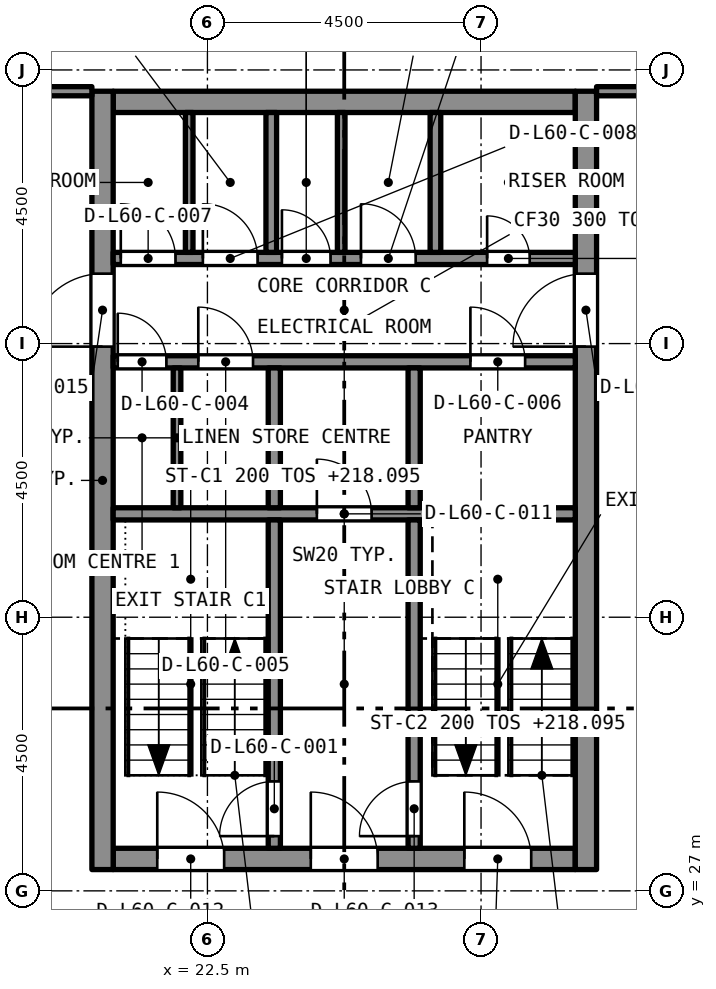
"""IFC4 building model, lengths in metres.
Left out: names, types, materials, properties, quantities, classifications, styles, units other than length and angle.
Written with IfcOpenShell. Run it as: python <this file> out.ifc"""

import sys

from ifc_helpers import new_model, si_unit, direction, frame, frame_2d, origin, place, context, subcontext, project, spatial, rectangle, extrude, element, fill, save


model = new_model("IFC4")
c1 = context("Model", 3, precision=1e-05, world=origin(), true_north=direction((0.0, 1.0)))
c2 = subcontext(c1, "Body", "Model", "MODEL_VIEW")
j1 = project(units=[si_unit("LENGTHUNIT", "METRE"), si_unit("PLANEANGLEUNIT", "RADIAN")], contexts=[c1])
p1 = place(None, origin())
s1 = spatial("IfcSite", under=j1, at=p1, CompositionType="ELEMENT")
p2 = place(p1, origin())
s2 = spatial("IfcBuilding", under=s1, at=p2, CompositionType="ELEMENT")
p3 = place(p2, frame((0.0, 0.0, 216.495)))
s3 = spatial("IfcBuildingStorey", under=s2, at=p3, CompositionType="ELEMENT", Elevation=216.495)
p4 = place(p3, frame((20.95, 27.525, 0.0), z_axis=(0.0, 0.0, 1.0), x_axis=(1.0, 0.0, 0.0)))
e1 = element("IfcWall", 1, at=p4, inside=s3, PredefinedType="SOLIDWALL", context=c2, shape_type="SweptSolid", body=[
    extrude(rectangle(XDim=7.6, YDim=0.35, at=frame_2d((3.8, 0.0))), origin(), (0.0, 0.0, 1.0), 3.2),
])
p5 = place(p4, frame((0.725, 0.0, 0.0)))
e2 = element("IfcOpeningElement", 2, at=p5, cuts=e1, PredefinedType="OPENING", context=c2, shape_type="SweptSolid", body=[
    extrude(rectangle(XDim=1.1, YDim=2.1, at=frame_2d((0.55, 1.05))), frame((0.0, 0.185, 0.0), z_axis=(0.0, -1.0, 0.0), x_axis=(1.0, 0.0, 0.0)), (0.0, 0.0, 1.0), 0.37),
])
p6 = place(p4, frame((3.25, 0.0, 0.0)))
e3 = element("IfcOpeningElement", 3, at=p6, cuts=e1, PredefinedType="OPENING", context=c2, shape_type="SweptSolid", body=[
    extrude(rectangle(XDim=1.1, YDim=2.1, at=frame_2d((0.55, 1.05))), frame((0.0, 0.185, 0.0), z_axis=(0.0, -1.0, 0.0), x_axis=(1.0, 0.0, 0.0)), (0.0, 0.0, 1.0), 0.37),
])
p7 = place(p4, frame((5.775, 0.0, 0.0)))
e4 = element("IfcOpeningElement", 4, at=p7, cuts=e1, PredefinedType="OPENING", context=c2, shape_type="SweptSolid", body=[
    extrude(rectangle(XDim=1.1, YDim=2.1, at=frame_2d((0.55, 1.05))), frame((0.0, 0.185, 0.0), z_axis=(0.0, -1.0, 0.0), x_axis=(1.0, 0.0, 0.0)), (0.0, 0.0, 1.0), 0.37),
])
p8 = place(p3, frame((20.95, 39.975, 0.0), z_axis=(0.0, 0.0, 1.0), x_axis=(1.0, 0.0, 0.0)))
e5 = element("IfcWall", 5, at=p8, inside=s3, PredefinedType="SOLIDWALL", context=c2, shape_type="SweptSolid", body=[
    extrude(rectangle(XDim=7.6, YDim=0.35, at=frame_2d((3.8, 0.0))), origin(), (0.0, 0.0, 1.0), 3.2),
])
p9 = place(p3, frame((20.775, 27.35, 0.0), z_axis=(0.0, 0.0, 1.0), x_axis=(0.0, 1.0, 0.0)))
e6 = element("IfcWall", 6, at=p9, inside=s3, PredefinedType="SOLIDWALL", context=c2, shape_type="SweptSolid", body=[
    extrude(rectangle(XDim=12.8, YDim=0.35, at=frame_2d((6.4, 0.0))), origin(), (0.0, 0.0, 1.0), 3.2),
])
p10 = place(p9, frame((8.6, 0.0, 0.0)))
e7 = element("IfcOpeningElement", 7, at=p10, cuts=e6, PredefinedType="OPENING", context=c2, shape_type="SweptSolid", body=[
    extrude(rectangle(XDim=1.2, YDim=2.1, at=frame_2d((0.6, 1.05))), frame((0.0, 0.185, 0.0), z_axis=(0.0, -1.0, 0.0), x_axis=(1.0, 0.0, 0.0)), (0.0, 0.0, 1.0), 0.37),
])
p11 = place(p3, frame((28.725, 27.35, 0.0), z_axis=(0.0, 0.0, 1.0), x_axis=(0.0, 1.0, 0.0)))
e8 = element("IfcWall", 8, at=p11, inside=s3, PredefinedType="SOLIDWALL", context=c2, shape_type="SweptSolid", body=[
    extrude(rectangle(XDim=12.8, YDim=0.35, at=frame_2d((6.4, 0.0))), origin(), (0.0, 0.0, 1.0), 3.2),
])
p12 = place(p11, frame((8.6, 0.0, 0.0)))
e9 = element("IfcOpeningElement", 9, at=p12, cuts=e8, PredefinedType="OPENING", context=c2, shape_type="SweptSolid", body=[
    extrude(rectangle(XDim=1.2, YDim=2.1, at=frame_2d((0.6, 1.05))), frame((0.0, 0.185, 0.0), z_axis=(0.0, -1.0, 0.0), x_axis=(1.0, 0.0, 0.0)), (0.0, 0.0, 1.0), 0.37),
])
p13 = place(p3, frame((18.4, 40.15, 0.0), z_axis=(0.0, 0.0, 1.0), x_axis=(1.0, 0.0, 0.0)))
e10 = element("IfcWall", 10, at=p13, inside=s3, PredefinedType="PARTITIONING", context=c2, shape_type="SweptSolid", body=[
    extrude(rectangle(XDim=2.2, YDim=0.15, at=frame_2d((1.1, 0.0))), origin(), (0.0, 0.0, 1.0), 2.75),
])
p14 = place(p13, frame((0.2, 0.0, 0.0)))
e11 = element("IfcOpeningElement", 11, at=p14, cuts=e10, PredefinedType="OPENING", context=c2, shape_type="SweptSolid", body=[
    extrude(rectangle(XDim=1.0, YDim=2.1, at=frame_2d((0.5, 1.05))), frame((0.0, 0.085, 0.0), z_axis=(0.0, -1.0, 0.0), x_axis=(1.0, 0.0, 0.0)), (0.0, 0.0, 1.0), 0.17),
])
p15 = place(p3, frame((28.9, 40.15, 0.0), z_axis=(0.0, 0.0, 1.0), x_axis=(1.0, 0.0, 0.0)))
e12 = element("IfcWall", 12, at=p15, inside=s3, PredefinedType="PARTITIONING", context=c2, shape_type="SweptSolid", body=[
    extrude(rectangle(XDim=2.2, YDim=0.15, at=frame_2d((1.1, 0.0))), origin(), (0.0, 0.0, 1.0), 2.75),
])
p16 = place(p3, frame((20.95, 33.2, 0.0), z_axis=(0.0, 0.0, 1.0), x_axis=(1.0, 0.0, 0.0)))
e13 = element("IfcWall", 13, at=p16, inside=s3, PredefinedType="SOLIDWALL", context=c2, shape_type="SweptSolid", body=[
    extrude(rectangle(XDim=7.6, YDim=0.2, at=frame_2d((3.8, 0.0))), origin(), (0.0, 0.0, 1.0), 2.9),
])
p17 = place(p16, frame((3.35, 0.0, 0.0)))
e14 = element("IfcOpeningElement", 14, at=p17, cuts=e13, PredefinedType="OPENING", context=c2, shape_type="SweptSolid", body=[
    extrude(rectangle(XDim=0.9, YDim=2.1, at=frame_2d((0.45, 1.05))), frame((0.0, 0.11, 0.0), z_axis=(0.0, -1.0, 0.0), x_axis=(1.0, 0.0, 0.0)), (0.0, 0.0, 1.0), 0.22),
])
p18 = place(p3, frame((20.95, 35.7, 0.0), z_axis=(0.0, 0.0, 1.0), x_axis=(1.0, 0.0, 0.0)))
e15 = element("IfcWall", 15, at=p18, inside=s3, PredefinedType="SOLIDWALL", context=c2, shape_type="SweptSolid", body=[
    extrude(rectangle(XDim=7.6, YDim=0.2, at=frame_2d((3.8, 0.0))), origin(), (0.0, 0.0, 1.0), 2.9),
])
p19 = place(p18, frame((0.075, 0.0, 0.0)))
e16 = element("IfcOpeningElement", 16, at=p19, cuts=e15, PredefinedType="OPENING", context=c2, shape_type="SweptSolid", body=[
    extrude(rectangle(XDim=0.8, YDim=2.1, at=frame_2d((0.4, 1.05))), frame((0.0, 0.11, 0.0), z_axis=(0.0, -1.0, 0.0), x_axis=(1.0, 0.0, 0.0)), (0.0, 0.0, 1.0), 0.22),
])
p20 = place(p18, frame((1.4, 0.0, 0.0)))
e17 = element("IfcOpeningElement", 17, at=p20, cuts=e15, PredefinedType="OPENING", context=c2, shape_type="SweptSolid", body=[
    extrude(rectangle(XDim=0.9, YDim=2.1, at=frame_2d((0.45, 1.05))), frame((0.0, 0.11, 0.0), z_axis=(0.0, -1.0, 0.0), x_axis=(1.0, 0.0, 0.0)), (0.0, 0.0, 1.0), 0.22),
])
p21 = place(p18, frame((5.875, 0.0, 0.0)))
e18 = element("IfcOpeningElement", 18, at=p21, cuts=e15, PredefinedType="OPENING", context=c2, shape_type="SweptSolid", body=[
    extrude(rectangle(XDim=0.9, YDim=2.1, at=frame_2d((0.45, 1.05))), frame((0.0, 0.11, 0.0), z_axis=(0.0, -1.0, 0.0), x_axis=(1.0, 0.0, 0.0)), (0.0, 0.0, 1.0), 0.22),
])
p22 = place(p3, frame((20.95, 37.4, 0.0), z_axis=(0.0, 0.0, 1.0), x_axis=(1.0, 0.0, 0.0)))
e19 = element("IfcWall", 19, at=p22, inside=s3, PredefinedType="SOLIDWALL", context=c2, shape_type="SweptSolid", body=[
    extrude(rectangle(XDim=7.6, YDim=0.2, at=frame_2d((3.8, 0.0))), origin(), (0.0, 0.0, 1.0), 2.9),
])
p23 = place(p22, frame((6.15, 0.0, 0.0)))
e20 = element("IfcOpeningElement", 20, at=p23, cuts=e19, PredefinedType="OPENING", context=c2, shape_type="SweptSolid", body=[
    extrude(rectangle(XDim=0.7, YDim=2.1, at=frame_2d((0.35, 1.05))), frame((0.0, 0.11, 0.0), z_axis=(0.0, -1.0, 0.0), x_axis=(1.0, 0.0, 0.0)), (0.0, 0.0, 1.0), 0.22),
])
p24 = place(p22, frame((0.125, 0.0, 0.0)))
e21 = element("IfcOpeningElement", 21, at=p24, cuts=e19, PredefinedType="OPENING", context=c2, shape_type="SweptSolid", body=[
    extrude(rectangle(XDim=0.9, YDim=2.1, at=frame_2d((0.45, 1.05))), frame((0.0, 0.11, 0.0), z_axis=(0.0, -1.0, 0.0), x_axis=(1.0, 0.0, 0.0)), (0.0, 0.0, 1.0), 0.22),
])
p25 = place(p22, frame((1.475, 0.0, 0.0)))
e22 = element("IfcOpeningElement", 22, at=p25, cuts=e19, PredefinedType="OPENING", context=c2, shape_type="SweptSolid", body=[
    extrude(rectangle(XDim=0.9, YDim=2.1, at=frame_2d((0.45, 1.05))), frame((0.0, 0.11, 0.0), z_axis=(0.0, -1.0, 0.0), x_axis=(1.0, 0.0, 0.0)), (0.0, 0.0, 1.0), 0.22),
])
p26 = place(p22, frame((2.775, 0.0, 0.0)))
e23 = element("IfcOpeningElement", 23, at=p26, cuts=e19, PredefinedType="OPENING", context=c2, shape_type="SweptSolid", body=[
    extrude(rectangle(XDim=0.8, YDim=2.1, at=frame_2d((0.4, 1.05))), frame((0.0, 0.11, 0.0), z_axis=(0.0, -1.0, 0.0), x_axis=(1.0, 0.0, 0.0)), (0.0, 0.0, 1.0), 0.22),
])
p27 = place(p22, frame((4.075, 0.0, 0.0)))
e24 = element("IfcOpeningElement", 24, at=p27, cuts=e19, PredefinedType="OPENING", context=c2, shape_type="SweptSolid", body=[
    extrude(rectangle(XDim=0.9, YDim=2.1, at=frame_2d((0.45, 1.05))), frame((0.0, 0.11, 0.0), z_axis=(0.0, -1.0, 0.0), x_axis=(1.0, 0.0, 0.0)), (0.0, 0.0, 1.0), 0.22),
])
p28 = place(p3, frame((23.6, 27.7, 0.0), z_axis=(0.0, 0.0, 1.0), x_axis=(0.0, 1.0, 0.0)))
e25 = element("IfcWall", 25, at=p28, inside=s3, PredefinedType="SOLIDWALL", context=c2, shape_type="SweptSolid", body=[
    extrude(rectangle(XDim=5.4, YDim=0.2, at=frame_2d((2.7, 0.0))), origin(), (0.0, 0.0, 1.0), 2.9),
])
p29 = place(p28, frame((0.2, 0.0, 0.0)))
e26 = element("IfcOpeningElement", 26, at=p29, cuts=e25, PredefinedType="OPENING", context=c2, shape_type="SweptSolid", body=[
    extrude(rectangle(XDim=0.9, YDim=2.1, at=frame_2d((0.45, 1.05))), frame((0.0, 0.11, 0.0), z_axis=(0.0, -1.0, 0.0), x_axis=(1.0, 0.0, 0.0)), (0.0, 0.0, 1.0), 0.22),
])
p30 = place(p3, frame((25.9, 27.7, 0.0), z_axis=(0.0, 0.0, 1.0), x_axis=(0.0, 1.0, 0.0)))
e27 = element("IfcWall", 27, at=p30, inside=s3, PredefinedType="SOLIDWALL", context=c2, shape_type="SweptSolid", body=[
    extrude(rectangle(XDim=5.4, YDim=0.2, at=frame_2d((2.7, 0.0))), origin(), (0.0, 0.0, 1.0), 2.9),
])
p31 = place(p30, frame((0.2, 0.0, 0.0)))
e28 = element("IfcOpeningElement", 28, at=p31, cuts=e27, PredefinedType="OPENING", context=c2, shape_type="SweptSolid", body=[
    extrude(rectangle(XDim=0.9, YDim=2.1, at=frame_2d((0.45, 1.05))), frame((0.0, 0.11, 0.0), z_axis=(0.0, -1.0, 0.0), x_axis=(1.0, 0.0, 0.0)), (0.0, 0.0, 1.0), 0.22),
])
for number, where, z_axis, x_axis in (
    (29, (23.6, 33.3, 0.0), (0.0, 0.0, 1.0), (0.0, 1.0, 0.0)),
    (30, (25.9, 33.3, 0.0), (0.0, 0.0, 1.0), (0.0, 1.0, 0.0)),
):
    element("IfcWall", number, at=place(p3, frame(where, z_axis=z_axis, x_axis=x_axis)), inside=s3, PredefinedType="SOLIDWALL", context=c2, shape_type="SweptSolid", body=[
        extrude(rectangle(XDim=2.3, YDim=0.2, at=frame_2d((1.15, 0.0))), origin(), (0.0, 0.0, 1.0), 2.9),
    ])
for number, where, z_axis, x_axis in (
    (31, (23.55, 37.5, 0.0), (0.0, 0.0, 1.0), (0.0, 1.0, 0.0)),
    (32, (26.25, 37.5, 0.0), (0.0, 0.0, 1.0), (0.0, 1.0, 0.0)),
):
    element("IfcWall", number, at=place(p3, frame(where, z_axis=z_axis, x_axis=x_axis)), inside=s3, PredefinedType="SOLIDWALL", context=c2, shape_type="SweptSolid", body=[
        extrude(rectangle(XDim=2.3, YDim=0.175, at=frame_2d((1.15, 0.0))), origin(), (0.0, 0.0, 1.0), 2.9),
    ])
for number, where, z_axis, x_axis in (
    (33, (22.0, 33.3, 0.0), (0.0, 0.0, 1.0), (0.0, 1.0, 0.0)),
    (34, (22.2, 37.5, 0.0), (0.0, 0.0, 1.0), (0.0, 1.0, 0.0)),
    (35, (24.7, 37.5, 0.0), (0.0, 0.0, 1.0), (0.0, 1.0, 0.0)),
):
    element("IfcWall", number, at=place(p3, frame(where, z_axis=z_axis, x_axis=x_axis)), inside=s3, PredefinedType="PARTITIONING", context=c2, shape_type="SweptSolid", body=[
        extrude(rectangle(XDim=2.3, YDim=0.125, at=frame_2d((1.15, 0.0))), origin(), (0.0, 0.0, 1.0), 2.9),
    ])
p32 = place(p29, origin())
e36 = element("IfcDoor", 36, at=p32, inside=s3, OperationType="SINGLE_SWING_LEFT", PredefinedType="DOOR", context=c2, shape_type="SweptSolid", body=[
    extrude(rectangle(XDim=0.9, YDim=2.1, at=frame_2d((0.45, 1.05))), frame((0.0, 0.025, 0.0), z_axis=(0.0, -1.0, 0.0), x_axis=(1.0, 0.0, 0.0)), (0.0, 0.0, 1.0), 0.05),
])
fill(e26, e36)
p33 = place(p31, origin())
e37 = element("IfcDoor", 37, at=p33, inside=s3, OperationType="SINGLE_SWING_LEFT", PredefinedType="DOOR", context=c2, shape_type="SweptSolid", body=[
    extrude(rectangle(XDim=0.9, YDim=2.1, at=frame_2d((0.45, 1.05))), frame((0.0, 0.025, 0.0), z_axis=(0.0, -1.0, 0.0), x_axis=(1.0, 0.0, 0.0)), (0.0, 0.0, 1.0), 0.05),
])
fill(e28, e37)
p34 = place(p23, origin())
e38 = element("IfcDoor", 38, at=p34, inside=s3, OperationType="SINGLE_SWING_LEFT", PredefinedType="DOOR", context=c2, shape_type="SweptSolid", body=[
    extrude(rectangle(XDim=0.7, YDim=2.1, at=frame_2d((0.35, 1.05))), frame((0.0, 0.025, 0.0), z_axis=(0.0, -1.0, 0.0), x_axis=(1.0, 0.0, 0.0)), (0.0, 0.0, 1.0), 0.05),
])
fill(e20, e38)
p35 = place(p19, origin())
e39 = element("IfcDoor", 39, at=p35, inside=s3, OperationType="SINGLE_SWING_LEFT", PredefinedType="DOOR", context=c2, shape_type="SweptSolid", body=[
    extrude(rectangle(XDim=0.8, YDim=2.1, at=frame_2d((0.4, 1.05))), frame((0.0, 0.025, 0.0), z_axis=(0.0, -1.0, 0.0), x_axis=(1.0, 0.0, 0.0)), (0.0, 0.0, 1.0), 0.05),
])
fill(e16, e39)
p36 = place(p20, origin())
e40 = element("IfcDoor", 40, at=p36, inside=s3, OperationType="SINGLE_SWING_LEFT", PredefinedType="DOOR", context=c2, shape_type="SweptSolid", body=[
    extrude(rectangle(XDim=0.9, YDim=2.1, at=frame_2d((0.45, 1.05))), frame((0.0, 0.025, 0.0), z_axis=(0.0, -1.0, 0.0), x_axis=(1.0, 0.0, 0.0)), (0.0, 0.0, 1.0), 0.05),
])
fill(e17, e40)
p37 = place(p21, origin())
e41 = element("IfcDoor", 41, at=p37, inside=s3, OperationType="SINGLE_SWING_LEFT", PredefinedType="DOOR", context=c2, shape_type="SweptSolid", body=[
    extrude(rectangle(XDim=0.9, YDim=2.1, at=frame_2d((0.45, 1.05))), frame((0.0, 0.025, 0.0), z_axis=(0.0, -1.0, 0.0), x_axis=(1.0, 0.0, 0.0)), (0.0, 0.0, 1.0), 0.05),
])
fill(e18, e41)
p38 = place(p24, origin())
e42 = element("IfcDoor", 42, at=p38, inside=s3, OperationType="SINGLE_SWING_LEFT", PredefinedType="DOOR", context=c2, shape_type="SweptSolid", body=[
    extrude(rectangle(XDim=0.9, YDim=2.1, at=frame_2d((0.45, 1.05))), frame((0.0, 0.025, 0.0), z_axis=(0.0, -1.0, 0.0), x_axis=(1.0, 0.0, 0.0)), (0.0, 0.0, 1.0), 0.05),
])
fill(e21, e42)
p39 = place(p25, origin())
e43 = element("IfcDoor", 43, at=p39, inside=s3, OperationType="SINGLE_SWING_LEFT", PredefinedType="DOOR", context=c2, shape_type="SweptSolid", body=[
    extrude(rectangle(XDim=0.9, YDim=2.1, at=frame_2d((0.45, 1.05))), frame((0.0, 0.025, 0.0), z_axis=(0.0, -1.0, 0.0), x_axis=(1.0, 0.0, 0.0)), (0.0, 0.0, 1.0), 0.05),
])
fill(e22, e43)
p40 = place(p26, origin())
e44 = element("IfcDoor", 44, at=p40, inside=s3, OperationType="SINGLE_SWING_LEFT", PredefinedType="DOOR", context=c2, shape_type="SweptSolid", body=[
    extrude(rectangle(XDim=0.8, YDim=2.1, at=frame_2d((0.4, 1.05))), frame((0.0, 0.025, 0.0), z_axis=(0.0, -1.0, 0.0), x_axis=(1.0, 0.0, 0.0)), (0.0, 0.0, 1.0), 0.05),
])
fill(e23, e44)
p41 = place(p27, origin())
e45 = element("IfcDoor", 45, at=p41, inside=s3, OperationType="SINGLE_SWING_LEFT", PredefinedType="DOOR", context=c2, shape_type="SweptSolid", body=[
    extrude(rectangle(XDim=0.9, YDim=2.1, at=frame_2d((0.45, 1.05))), frame((0.0, 0.025, 0.0), z_axis=(0.0, -1.0, 0.0), x_axis=(1.0, 0.0, 0.0)), (0.0, 0.0, 1.0), 0.05),
])
fill(e24, e45)
p42 = place(p17, origin())
e46 = element("IfcDoor", 46, at=p42, inside=s3, OperationType="SINGLE_SWING_LEFT", PredefinedType="DOOR", context=c2, shape_type="SweptSolid", body=[
    extrude(rectangle(XDim=0.9, YDim=2.1, at=frame_2d((0.45, 1.05))), frame((0.0, 0.025, 0.0), z_axis=(0.0, -1.0, 0.0), x_axis=(1.0, 0.0, 0.0)), (0.0, 0.0, 1.0), 0.05),
])
fill(e14, e46)
p43 = place(p5, origin())
e47 = element("IfcDoor", 47, at=p43, inside=s3, OperationType="SINGLE_SWING_LEFT", PredefinedType="DOOR", context=c2, shape_type="SweptSolid", body=[
    extrude(rectangle(XDim=1.1, YDim=2.1, at=frame_2d((0.55, 1.05))), frame((0.0, 0.025, 0.0), z_axis=(0.0, -1.0, 0.0), x_axis=(1.0, 0.0, 0.0)), (0.0, 0.0, 1.0), 0.05),
])
fill(e2, e47)
p44 = place(p6, origin())
e48 = element("IfcDoor", 48, at=p44, inside=s3, OperationType="SINGLE_SWING_LEFT", PredefinedType="DOOR", context=c2, shape_type="SweptSolid", body=[
    extrude(rectangle(XDim=1.1, YDim=2.1, at=frame_2d((0.55, 1.05))), frame((0.0, 0.025, 0.0), z_axis=(0.0, -1.0, 0.0), x_axis=(1.0, 0.0, 0.0)), (0.0, 0.0, 1.0), 0.05),
])
fill(e3, e48)
p45 = place(p7, origin())
e49 = element("IfcDoor", 49, at=p45, inside=s3, OperationType="SINGLE_SWING_LEFT", PredefinedType="DOOR", context=c2, shape_type="SweptSolid", body=[
    extrude(rectangle(XDim=1.1, YDim=2.1, at=frame_2d((0.55, 1.05))), frame((0.0, 0.025, 0.0), z_axis=(0.0, -1.0, 0.0), x_axis=(1.0, 0.0, 0.0)), (0.0, 0.0, 1.0), 0.05),
])
fill(e4, e49)
p46 = place(p10, origin())
e50 = element("IfcDoor", 50, at=p46, inside=s3, OperationType="SINGLE_SWING_LEFT", PredefinedType="DOOR", context=c2, shape_type="SweptSolid", body=[
    extrude(rectangle(XDim=1.2, YDim=2.1, at=frame_2d((0.6, 1.05))), frame((0.0, 0.025, 0.0), z_axis=(0.0, -1.0, 0.0), x_axis=(1.0, 0.0, 0.0)), (0.0, 0.0, 1.0), 0.05),
])
fill(e7, e50)
p47 = place(p12, origin())
e51 = element("IfcDoor", 51, at=p47, inside=s3, OperationType="SINGLE_SWING_LEFT", PredefinedType="DOOR", context=c2, shape_type="SweptSolid", body=[
    extrude(rectangle(XDim=1.2, YDim=2.1, at=frame_2d((0.6, 1.05))), frame((0.0, 0.025, 0.0), z_axis=(0.0, -1.0, 0.0), x_axis=(1.0, 0.0, 0.0)), (0.0, 0.0, 1.0), 0.05),
])
fill(e9, e51)
save(model, sys.argv[1])
